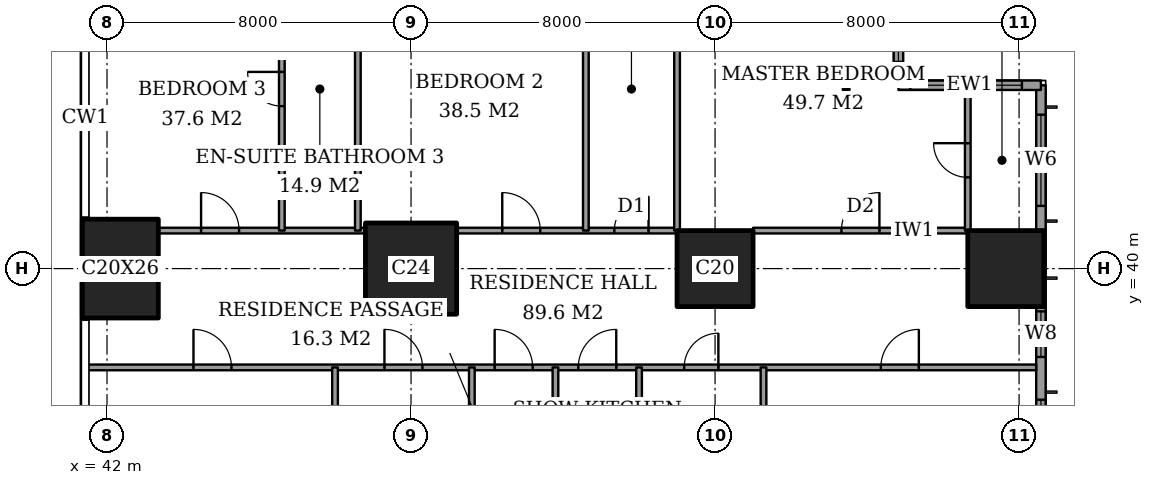
"""IFC4 building model, lengths in metres.
Left out: names, types, materials, properties, quantities, classifications, styles, units other than length and angle.
Written with IfcOpenShell. Run it as: python <this file> out.ifc"""

import sys

from ifc_helpers import new_model, si_unit, direction, frame, frame_2d, origin, origin_2d, place, context, subcontext, project, spatial, rectangle, extrude, element, fill, save


model = new_model("IFC4")
c1 = context("Model", 3, precision=1e-05, world=origin(), true_north=direction((0.0, 1.0)))
c2 = subcontext(c1, "Body", "Model", "MODEL_VIEW")
j1 = project(units=[si_unit("LENGTHUNIT", "METRE"), si_unit("PLANEANGLEUNIT", "RADIAN")], contexts=[c1])
p1 = place(None, origin())
s1 = spatial("IfcSite", under=j1, at=p1, CompositionType="ELEMENT")
p2 = place(p1, origin())
s2 = spatial("IfcBuilding", under=s1, at=p2, CompositionType="ELEMENT")
p3 = place(p2, frame((0.0, 0.0, 44.0)))
s3 = spatial("IfcBuildingStorey", under=s2, at=p3, CompositionType="ELEMENT", Elevation=44.0)
p4 = place(p3, frame((42.35, 40.0, 0.0), z_axis=(0.0, 0.0, 1.0), x_axis=(1.0, 0.0, 0.0)))
e1 = element("IfcColumn", 1, at=p4, inside=s3, PredefinedType="COLUMN", context=c2, shape_type="SweptSolid", body=[
    extrude(rectangle(XDim=2.0, YDim=2.6, at=origin_2d()), origin(), (0.0, 0.0, 1.0), 3.6),
])
p5 = place(p3, frame((50.0, 40.0, 0.0), z_axis=(0.0, 0.0, 1.0), x_axis=(1.0, 0.0, 0.0)))
e2 = element("IfcColumn", 2, at=p5, inside=s3, PredefinedType="COLUMN", context=c2, shape_type="SweptSolid", body=[
    extrude(rectangle(XDim=2.4, YDim=2.4, at=origin_2d()), origin(), (0.0, 0.0, 1.0), 3.6),
])
for number, where, z_axis, x_axis in (
    (3, (58.0, 40.0, 0.0), (0.0, 0.0, 1.0), (1.0, 0.0, 0.0)),
    (4, (65.65, 40.0, 0.0), (0.0, 0.0, 1.0), (1.0, 0.0, 0.0)),
):
    element("IfcColumn", number, at=place(p3, frame(where, z_axis=z_axis, x_axis=x_axis)), inside=s3, PredefinedType="COLUMN", context=c2, shape_type="SweptSolid", body=[
        extrude(rectangle(XDim=2.0, YDim=2.0, at=origin_2d()), origin(), (0.0, 0.0, 1.0), 3.6),
    ])
p6 = place(p3, frame((66.575, 3.175, 0.0), z_axis=(0.0, 0.0, 1.0), x_axis=(0.0, 1.0, 0.0)))
e5 = element("IfcWall", 5, at=p6, inside=s3, PredefinedType="SOLIDWALL", context=c2, shape_type="SweptSolid", body=[
    extrude(rectangle(XDim=41.65, YDim=0.25, at=frame_2d((20.825, 0.0))), origin(), (0.0, 0.0, 1.0), 3.6),
])
p7 = place(p6, frame((0.775, 0.0, 0.6)))
e6 = element("IfcOpeningElement", 6, at=p7, cuts=e5, PredefinedType="OPENING", context=c2, shape_type="SweptSolid", body=[
    extrude(rectangle(XDim=2.4, YDim=2.0, at=frame_2d((1.2, 1.0))), frame((0.0, 0.135, 0.0), z_axis=(0.0, -1.0, 0.0), x_axis=(1.0, 0.0, 0.0)), (0.0, 0.0, 1.0), 0.27),
])
p8 = place(p6, frame((6.1, 0.0, 0.6)))
e7 = element("IfcOpeningElement", 7, at=p8, cuts=e5, PredefinedType="OPENING", context=c2, shape_type="SweptSolid", body=[
    extrude(rectangle(XDim=1.2, YDim=2.0, at=frame_2d((0.6, 1.0))), frame((0.0, 0.135, 0.0), z_axis=(0.0, -1.0, 0.0), x_axis=(1.0, 0.0, 0.0)), (0.0, 0.0, 1.0), 0.27),
])
p9 = place(p6, frame((8.275, 0.0, 0.6)))
e8 = element("IfcOpeningElement", 8, at=p9, cuts=e5, PredefinedType="OPENING", context=c2, shape_type="SweptSolid", body=[
    extrude(rectangle(XDim=2.4, YDim=2.0, at=frame_2d((1.2, 1.0))), frame((0.0, 0.135, 0.0), z_axis=(0.0, -1.0, 0.0), x_axis=(1.0, 0.0, 0.0)), (0.0, 0.0, 1.0), 0.27),
])
p10 = place(p6, frame((15.775, 0.0, 0.6)))
e9 = element("IfcOpeningElement", 9, at=p10, cuts=e5, PredefinedType="OPENING", context=c2, shape_type="SweptSolid", body=[
    extrude(rectangle(XDim=2.4, YDim=2.0, at=frame_2d((1.2, 1.0))), frame((0.0, 0.135, 0.0), z_axis=(0.0, -1.0, 0.0), x_axis=(1.0, 0.0, 0.0)), (0.0, 0.0, 1.0), 0.27),
])
p11 = place(p6, frame((23.475, 0.0, 0.6)))
e10 = element("IfcOpeningElement", 10, at=p11, cuts=e5, PredefinedType="OPENING", context=c2, shape_type="SweptSolid", body=[
    extrude(rectangle(XDim=2.4, YDim=2.0, at=frame_2d((1.2, 1.0))), frame((0.0, 0.135, 0.0), z_axis=(0.0, -1.0, 0.0), x_axis=(1.0, 0.0, 0.0)), (0.0, 0.0, 1.0), 0.27),
])
p12 = place(p6, frame((30.975, 0.0, 0.6)))
e11 = element("IfcOpeningElement", 11, at=p12, cuts=e5, PredefinedType="OPENING", context=c2, shape_type="SweptSolid", body=[
    extrude(rectangle(XDim=2.4, YDim=2.0, at=frame_2d((1.2, 1.0))), frame((0.0, 0.135, 0.0), z_axis=(0.0, -1.0, 0.0), x_axis=(1.0, 0.0, 0.0)), (0.0, 0.0, 1.0), 0.27),
])
p13 = place(p6, frame((34.5, 0.0, 0.6)))
e12 = element("IfcOpeningElement", 12, at=p13, cuts=e5, PredefinedType="OPENING", context=c2, shape_type="SweptSolid", body=[
    extrude(rectangle(XDim=1.2, YDim=2.0, at=frame_2d((0.6, 1.0))), frame((0.0, 0.135, 0.0), z_axis=(0.0, -1.0, 0.0), x_axis=(1.0, 0.0, 0.0)), (0.0, 0.0, 1.0), 0.27),
])
p14 = place(p6, frame((38.475, 0.0, 0.6)))
e13 = element("IfcOpeningElement", 13, at=p14, cuts=e5, PredefinedType="OPENING", context=c2, shape_type="SweptSolid", body=[
    extrude(rectangle(XDim=2.4, YDim=2.0, at=frame_2d((1.2, 1.0))), frame((0.0, 0.135, 0.0), z_axis=(0.0, -1.0, 0.0), x_axis=(1.0, 0.0, 0.0)), (0.0, 0.0, 1.0), 0.27),
])
p15 = place(p3, frame((66.575, 44.825, 0.0), z_axis=(0.0, 0.0, 1.0), x_axis=(-1.0, 0.0, 0.0)))
e14 = element("IfcWall", 14, at=p15, inside=s3, PredefinedType="SOLIDWALL", context=c2, shape_type="SweptSolid", body=[
    extrude(rectangle(XDim=3.75, YDim=0.25, at=frame_2d((1.875, 0.0))), origin(), (0.0, 0.0, 1.0), 3.6),
])
p16 = place(p15, frame((0.5, 0.0, 0.6)))
e15 = element("IfcOpeningElement", 15, at=p16, cuts=e14, PredefinedType="OPENING", context=c2, shape_type="SweptSolid", body=[
    extrude(rectangle(XDim=1.2, YDim=2.0, at=frame_2d((0.6, 1.0))), frame((0.0, 0.135, 0.0), z_axis=(0.0, -1.0, 0.0), x_axis=(1.0, 0.0, 0.0)), (0.0, 0.0, 1.0), 0.27),
])
p17 = place(p15, frame((2.238, 0.0, 0.6)))
e16 = element("IfcOpeningElement", 16, at=p17, cuts=e14, PredefinedType="OPENING", context=c2, shape_type="SweptSolid", body=[
    extrude(rectangle(XDim=1.2, YDim=2.0, at=frame_2d((0.6, 1.0))), frame((0.0, 0.135, 0.0), z_axis=(0.0, -1.0, 0.0), x_axis=(1.0, 0.0, 0.0)), (0.0, 0.0, 1.0), 0.27),
])
p18 = place(p3, frame((62.825, 44.825, 0.0), z_axis=(0.0, 0.0, 1.0), x_axis=(0.0, 1.0, 0.0)))
e17 = element("IfcWall", 17, at=p18, inside=s3, PredefinedType="SOLIDWALL", context=c2, shape_type="SweptSolid", body=[
    extrude(rectangle(XDim=3.75, YDim=0.25, at=frame_2d((1.875, 0.0))), origin(), (0.0, 0.0, 1.0), 3.6),
])
p19 = place(p18, frame((0.613, 0.0, 0.6)))
e18 = element("IfcOpeningElement", 18, at=p19, cuts=e17, PredefinedType="OPENING", context=c2, shape_type="SweptSolid", body=[
    extrude(rectangle(XDim=2.4, YDim=2.0, at=frame_2d((1.2, 1.0))), frame((0.0, 0.135, 0.0), z_axis=(0.0, -1.0, 0.0), x_axis=(1.0, 0.0, 0.0)), (0.0, 0.0, 1.0), 0.27),
])
p20 = place(p3, frame((41.439, 37.4, 0.0), z_axis=(0.0, 0.0, 1.0), x_axis=(1.0, 0.0, 0.0)))
e19 = element("IfcWall", 19, at=p20, inside=s3, PredefinedType="PARTITIONING", context=c2, shape_type="SweptSolid", body=[
    extrude(rectangle(XDim=25.011, YDim=0.15, at=frame_2d((12.505, 0.0))), origin(), (0.0, 0.0, 1.0), 3.35),
])
p21 = place(p20, frame((10.761, 0.0, 0.0)))
e20 = element("IfcOpeningElement", 20, at=p21, cuts=e19, PredefinedType="OPENING", context=c2, shape_type="SweptSolid", body=[
    extrude(rectangle(XDim=1.0, YDim=2.1, at=frame_2d((0.5, 1.05))), frame((0.0, 0.085, 0.0), z_axis=(0.0, -1.0, 0.0), x_axis=(1.0, 0.0, 0.0)), (0.0, 0.0, 1.0), 0.17),
])
p22 = place(p20, frame((20.924, 0.0, 0.0)))
e21 = element("IfcOpeningElement", 21, at=p22, cuts=e19, PredefinedType="OPENING", context=c2, shape_type="SweptSolid", body=[
    extrude(rectangle(XDim=1.0, YDim=2.1, at=frame_2d((0.5, 1.05))), frame((0.0, 0.085, 0.0), z_axis=(0.0, -1.0, 0.0), x_axis=(1.0, 0.0, 0.0)), (0.0, 0.0, 1.0), 0.17),
])
p23 = place(p20, frame((15.749, 0.0, 0.0)))
e22 = element("IfcOpeningElement", 22, at=p23, cuts=e19, PredefinedType="OPENING", context=c2, shape_type="SweptSolid", body=[
    extrude(rectangle(XDim=0.9, YDim=2.1, at=frame_2d((0.45, 1.05))), frame((0.0, 0.085, 0.0), z_axis=(0.0, -1.0, 0.0), x_axis=(1.0, 0.0, 0.0)), (0.0, 0.0, 1.0), 0.17),
])
p24 = place(p20, frame((12.961, 0.0, 0.0)))
e23 = element("IfcOpeningElement", 23, at=p24, cuts=e19, PredefinedType="OPENING", context=c2, shape_type="SweptSolid", body=[
    extrude(rectangle(XDim=1.0, YDim=2.1, at=frame_2d((0.5, 1.05))), frame((0.0, 0.085, 0.0), z_axis=(0.0, -1.0, 0.0), x_axis=(1.0, 0.0, 0.0)), (0.0, 0.0, 1.0), 0.17),
])
p25 = place(p20, frame((7.861, 0.0, 0.0)))
e24 = element("IfcOpeningElement", 24, at=p25, cuts=e19, PredefinedType="OPENING", context=c2, shape_type="SweptSolid", body=[
    extrude(rectangle(XDim=1.0, YDim=2.1, at=frame_2d((0.5, 1.05))), frame((0.0, 0.085, 0.0), z_axis=(0.0, -1.0, 0.0), x_axis=(1.0, 0.0, 0.0)), (0.0, 0.0, 1.0), 0.17),
])
p26 = place(p20, frame((2.836, 0.0, 0.0)))
e25 = element("IfcOpeningElement", 25, at=p26, cuts=e19, PredefinedType="OPENING", context=c2, shape_type="SweptSolid", body=[
    extrude(rectangle(XDim=1.0, YDim=2.1, at=frame_2d((0.5, 1.05))), frame((0.0, 0.085, 0.0), z_axis=(0.0, -1.0, 0.0), x_axis=(1.0, 0.0, 0.0)), (0.0, 0.0, 1.0), 0.17),
])
p27 = place(p3, frame((43.35, 41.0, 0.0), z_axis=(0.0, 0.0, 1.0), x_axis=(1.0, 0.0, 0.0)))
e26 = element("IfcWall", 26, at=p27, inside=s3, PredefinedType="PARTITIONING", context=c2, shape_type="SweptSolid", body=[
    extrude(rectangle(XDim=5.45, YDim=0.15, at=frame_2d((2.725, 0.0))), origin(), (0.0, 0.0, 1.0), 3.35),
])
p28 = place(p27, frame((1.125, 0.0, 0.0)))
e27 = element("IfcOpeningElement", 27, at=p28, cuts=e26, PredefinedType="OPENING", context=c2, shape_type="SweptSolid", body=[
    extrude(rectangle(XDim=1.0, YDim=2.1, at=frame_2d((0.5, 1.05))), frame((0.0, 0.085, 0.0), z_axis=(0.0, -1.0, 0.0), x_axis=(1.0, 0.0, 0.0)), (0.0, 0.0, 1.0), 0.17),
])
p29 = place(p3, frame((51.2, 41.0, 0.0), z_axis=(0.0, 0.0, 1.0), x_axis=(1.0, 0.0, 0.0)))
e28 = element("IfcWall", 28, at=p29, inside=s3, PredefinedType="PARTITIONING", context=c2, shape_type="SweptSolid", body=[
    extrude(rectangle(XDim=5.8, YDim=0.15, at=frame_2d((2.9, 0.0))), origin(), (0.0, 0.0, 1.0), 3.35),
])
p30 = place(p29, frame((4.15, 0.0, 0.0)))
e29 = element("IfcOpeningElement", 29, at=p30, cuts=e28, PredefinedType="OPENING", context=c2, shape_type="SweptSolid", body=[
    extrude(rectangle(XDim=0.9, YDim=2.1, at=frame_2d((0.45, 1.05))), frame((0.0, 0.085, 0.0), z_axis=(0.0, -1.0, 0.0), x_axis=(1.0, 0.0, 0.0)), (0.0, 0.0, 1.0), 0.17),
])
p31 = place(p29, frame((1.2, 0.0, 0.0)))
e30 = element("IfcOpeningElement", 30, at=p31, cuts=e28, PredefinedType="OPENING", context=c2, shape_type="SweptSolid", body=[
    extrude(rectangle(XDim=1.0, YDim=2.1, at=frame_2d((0.5, 1.05))), frame((0.0, 0.085, 0.0), z_axis=(0.0, -1.0, 0.0), x_axis=(1.0, 0.0, 0.0)), (0.0, 0.0, 1.0), 0.17),
])
p32 = place(p3, frame((59.0, 41.0, 0.0), z_axis=(0.0, 0.0, 1.0), x_axis=(1.0, 0.0, 0.0)))
e31 = element("IfcWall", 31, at=p32, inside=s3, PredefinedType="PARTITIONING", context=c2, shape_type="SweptSolid", body=[
    extrude(rectangle(XDim=5.65, YDim=0.15, at=frame_2d((2.825, 0.0))), origin(), (0.0, 0.0, 1.0), 3.35),
])
p33 = place(p32, frame((2.325, 0.0, 0.0)))
e32 = element("IfcOpeningElement", 32, at=p33, cuts=e31, PredefinedType="OPENING", context=c2, shape_type="SweptSolid", body=[
    extrude(rectangle(XDim=1.0, YDim=2.1, at=frame_2d((0.5, 1.05))), frame((0.0, 0.085, 0.0), z_axis=(0.0, -1.0, 0.0), x_axis=(1.0, 0.0, 0.0)), (0.0, 0.0, 1.0), 0.17),
])
p34 = place(p3, frame((46.6, 41.0, 0.0), z_axis=(0.0, 0.0, 1.0), x_axis=(0.0, 1.0, 0.0)))
e33 = element("IfcWall", 33, at=p34, inside=s3, PredefinedType="PARTITIONING", context=c2, shape_type="SweptSolid", body=[
    extrude(rectangle(XDim=7.45, YDim=0.15, at=frame_2d((3.725, 0.0))), origin(), (0.0, 0.0, 1.0), 3.35),
])
p35 = place(p34, frame((3.275, 0.0, 0.0)))
e34 = element("IfcOpeningElement", 34, at=p35, cuts=e33, PredefinedType="OPENING", context=c2, shape_type="SweptSolid", body=[
    extrude(rectangle(XDim=0.9, YDim=2.1, at=frame_2d((0.45, 1.05))), frame((0.0, 0.085, 0.0), z_axis=(0.0, -1.0, 0.0), x_axis=(1.0, 0.0, 0.0)), (0.0, 0.0, 1.0), 0.17),
])
p36 = place(p3, frame((48.0, 28.0, 0.0), z_axis=(0.0, 0.0, 1.0), x_axis=(0.0, 1.0, 0.0)))
e35 = element("IfcWall", 35, at=p36, inside=s3, PredefinedType="PARTITIONING", context=c2, shape_type="SweptSolid", body=[
    extrude(rectangle(XDim=9.4, YDim=0.15, at=frame_2d((4.7, 0.0))), origin(), (0.0, 0.0, 1.0), 3.35),
])
p37 = place(p36, frame((0.55, 0.0, 0.0)))
e36 = element("IfcOpeningElement", 36, at=p37, cuts=e35, PredefinedType="OPENING", context=c2, shape_type="SweptSolid", body=[
    extrude(rectangle(XDim=0.9, YDim=2.1, at=frame_2d((0.45, 1.05))), frame((0.0, 0.085, 0.0), z_axis=(0.0, -1.0, 0.0), x_axis=(1.0, 0.0, 0.0)), (0.0, 0.0, 1.0), 0.17),
])
p38 = place(p3, frame((48.6, 41.0, 0.0), z_axis=(0.0, 0.0, 1.0), x_axis=(0.0, 1.0, 0.0)))
e37 = element("IfcWall", 37, at=p38, inside=s3, PredefinedType="PARTITIONING", context=c2, shape_type="SweptSolid", body=[
    extrude(rectangle(XDim=7.45, YDim=0.15, at=frame_2d((3.725, 0.0))), origin(), (0.0, 0.0, 1.0), 3.35),
])
for number, where, z_axis, x_axis in (
    (38, (51.6, 30.0, 0.0), (0.0, 0.0, 1.0), (0.0, 1.0, 0.0)),
    (39, (53.8, 30.0, 0.0), (0.0, 0.0, 1.0), (0.0, 1.0, 0.0)),
):
    element("IfcWall", number, at=place(p3, frame(where, z_axis=z_axis, x_axis=x_axis)), inside=s3, PredefinedType="PARTITIONING", context=c2, shape_type="SweptSolid", body=[
        extrude(rectangle(XDim=7.4, YDim=0.15, at=frame_2d((3.7, 0.0))), origin(), (0.0, 0.0, 1.0), 3.35),
    ])
p39 = place(p3, frame((54.6, 41.0, 0.0), z_axis=(0.0, 0.0, 1.0), x_axis=(0.0, 1.0, 0.0)))
e40 = element("IfcWall", 40, at=p39, inside=s3, PredefinedType="PARTITIONING", context=c2, shape_type="SweptSolid", body=[
    extrude(rectangle(XDim=7.45, YDim=0.15, at=frame_2d((3.725, 0.0))), origin(), (0.0, 0.0, 1.0), 3.35),
])
p40 = place(p3, frame((56.0, 28.0, 0.0), z_axis=(0.0, 0.0, 1.0), x_axis=(0.0, 1.0, 0.0)))
e41 = element("IfcWall", 41, at=p40, inside=s3, PredefinedType="PARTITIONING", context=c2, shape_type="SweptSolid", body=[
    extrude(rectangle(XDim=9.4, YDim=0.15, at=frame_2d((4.7, 0.0))), origin(), (0.0, 0.0, 1.0), 3.35),
])
p41 = place(p40, frame((0.5, 0.0, 0.0)))
e42 = element("IfcOpeningElement", 42, at=p41, cuts=e41, PredefinedType="OPENING", context=c2, shape_type="SweptSolid", body=[
    extrude(rectangle(XDim=1.0, YDim=2.1, at=frame_2d((0.5, 1.05))), frame((0.0, 0.085, 0.0), z_axis=(0.0, -1.0, 0.0), x_axis=(1.0, 0.0, 0.0)), (0.0, 0.0, 1.0), 0.17),
])
p42 = place(p3, frame((57.0, 41.0, 0.0), z_axis=(0.0, 0.0, 1.0), x_axis=(0.0, 1.0, 0.0)))
e43 = element("IfcWall", 43, at=p42, inside=s3, PredefinedType="PARTITIONING", context=c2, shape_type="SweptSolid", body=[
    extrude(rectangle(XDim=5.65, YDim=0.15, at=frame_2d((2.825, 0.0))), origin(), (0.0, 0.0, 1.0), 3.35),
])
p43 = place(p3, frame((59.275, 33.2, 0.0), z_axis=(0.0, 0.0, 1.0), x_axis=(0.0, 1.0, 0.0)))
e44 = element("IfcWall", 44, at=p43, inside=s3, PredefinedType="PARTITIONING", context=c2, shape_type="SweptSolid", body=[
    extrude(rectangle(XDim=4.2, YDim=0.15, at=frame_2d((2.1, 0.0))), origin(), (0.0, 0.0, 1.0), 3.35),
])
p44 = place(p3, frame((64.65, 41.0, 0.0), z_axis=(0.0, 0.0, 1.0), x_axis=(0.0, 1.0, 0.0)))
e45 = element("IfcWall", 45, at=p44, inside=s3, PredefinedType="PARTITIONING", context=c2, shape_type="SweptSolid", body=[
    extrude(rectangle(XDim=3.7, YDim=0.15, at=frame_2d((1.85, 0.0))), origin(), (0.0, 0.0, 1.0), 3.35),
])
p45 = place(p44, frame((1.4, 0.0, 0.0)))
e46 = element("IfcOpeningElement", 46, at=p45, cuts=e45, PredefinedType="OPENING", context=c2, shape_type="SweptSolid", body=[
    extrude(rectangle(XDim=0.9, YDim=2.1, at=frame_2d((0.45, 1.05))), frame((0.0, 0.085, 0.0), z_axis=(0.0, -1.0, 0.0), x_axis=(1.0, 0.0, 0.0)), (0.0, 0.0, 1.0), 0.17),
])
p46 = place(p12, origin())
e47 = element("IfcWindow", 47, at=p46, inside=s3, PartitioningType="SINGLE_PANEL", PredefinedType="WINDOW", context=c2, shape_type="SweptSolid", body=[
    extrude(rectangle(XDim=2.4, YDim=2.0, at=frame_2d((1.2, 1.0))), frame((0.0, 0.03, 0.0), z_axis=(0.0, -1.0, 0.0), x_axis=(1.0, 0.0, 0.0)), (0.0, 0.0, 1.0), 0.06),
])
fill(e11, e47)
p47 = place(p13, origin())
e48 = element("IfcWindow", 48, at=p47, inside=s3, PartitioningType="SINGLE_PANEL", PredefinedType="WINDOW", context=c2, shape_type="SweptSolid", body=[
    extrude(rectangle(XDim=1.2, YDim=2.0, at=frame_2d((0.6, 1.0))), frame((0.0, 0.03, 0.0), z_axis=(0.0, -1.0, 0.0), x_axis=(1.0, 0.0, 0.0)), (0.0, 0.0, 1.0), 0.06),
])
fill(e12, e48)
p48 = place(p14, origin())
e49 = element("IfcWindow", 49, at=p48, inside=s3, PartitioningType="SINGLE_PANEL", PredefinedType="WINDOW", context=c2, shape_type="SweptSolid", body=[
    extrude(rectangle(XDim=2.4, YDim=2.0, at=frame_2d((1.2, 1.0))), frame((0.0, 0.03, 0.0), z_axis=(0.0, -1.0, 0.0), x_axis=(1.0, 0.0, 0.0)), (0.0, 0.0, 1.0), 0.06),
])
fill(e13, e49)
p49 = place(p16, origin())
e50 = element("IfcWindow", 50, at=p49, inside=s3, PartitioningType="SINGLE_PANEL", PredefinedType="WINDOW", context=c2, shape_type="SweptSolid", body=[
    extrude(rectangle(XDim=1.2, YDim=2.0, at=frame_2d((0.6, 1.0))), frame((0.0, 0.03, 0.0), z_axis=(0.0, -1.0, 0.0), x_axis=(1.0, 0.0, 0.0)), (0.0, 0.0, 1.0), 0.06),
])
fill(e15, e50)
p50 = place(p17, origin())
e51 = element("IfcWindow", 51, at=p50, inside=s3, PartitioningType="SINGLE_PANEL", PredefinedType="WINDOW", context=c2, shape_type="SweptSolid", body=[
    extrude(rectangle(XDim=1.2, YDim=2.0, at=frame_2d((0.6, 1.0))), frame((0.0, 0.03, 0.0), z_axis=(0.0, -1.0, 0.0), x_axis=(1.0, 0.0, 0.0)), (0.0, 0.0, 1.0), 0.06),
])
fill(e16, e51)
p51 = place(p19, origin())
e52 = element("IfcWindow", 52, at=p51, inside=s3, PartitioningType="SINGLE_PANEL", PredefinedType="WINDOW", context=c2, shape_type="SweptSolid", body=[
    extrude(rectangle(XDim=2.4, YDim=2.0, at=frame_2d((1.2, 1.0))), frame((0.0, 0.03, 0.0), z_axis=(0.0, -1.0, 0.0), x_axis=(1.0, 0.0, 0.0)), (0.0, 0.0, 1.0), 0.06),
])
fill(e18, e52)
p52 = place(p45, origin())
e53 = element("IfcDoor", 53, at=p52, inside=s3, OperationType="SINGLE_SWING_LEFT", PredefinedType="DOOR", context=c2, shape_type="SweptSolid", body=[
    extrude(rectangle(XDim=0.9, YDim=2.1, at=frame_2d((0.45, 1.05))), frame((0.0, 0.025, 0.0), z_axis=(0.0, -1.0, 0.0), x_axis=(1.0, 0.0, 0.0)), (0.0, 0.0, 1.0), 0.05),
])
fill(e46, e53)
p53 = place(p33, origin())
e54 = element("IfcDoor", 54, at=p53, inside=s3, OperationType="SINGLE_SWING_LEFT", PredefinedType="DOOR", context=c2, shape_type="SweptSolid", body=[
    extrude(rectangle(XDim=1.0, YDim=2.1, at=frame_2d((0.5, 1.05))), frame((0.0, 0.025, 0.0), z_axis=(0.0, -1.0, 0.0), x_axis=(1.0, 0.0, 0.0)), (0.0, 0.0, 1.0), 0.05),
])
fill(e32, e54)
p54 = place(p30, origin())
e55 = element("IfcDoor", 55, at=p54, inside=s3, OperationType="SINGLE_SWING_LEFT", PredefinedType="DOOR", context=c2, shape_type="SweptSolid", body=[
    extrude(rectangle(XDim=0.9, YDim=2.1, at=frame_2d((0.45, 1.05))), frame((0.0, 0.025, 0.0), z_axis=(0.0, -1.0, 0.0), x_axis=(1.0, 0.0, 0.0)), (0.0, 0.0, 1.0), 0.05),
])
fill(e29, e55)
p55 = place(p31, origin())
e56 = element("IfcDoor", 56, at=p55, inside=s3, OperationType="SINGLE_SWING_RIGHT", PredefinedType="DOOR", context=c2, shape_type="SweptSolid", body=[
    extrude(rectangle(XDim=1.0, YDim=2.1, at=frame_2d((0.5, 1.05))), frame((0.0, 0.025, 0.0), z_axis=(0.0, -1.0, 0.0), x_axis=(1.0, 0.0, 0.0)), (0.0, 0.0, 1.0), 0.05),
])
fill(e30, e56)
p56 = place(p35, origin())
e57 = element("IfcDoor", 57, at=p56, inside=s3, OperationType="SINGLE_SWING_LEFT", PredefinedType="DOOR", context=c2, shape_type="SweptSolid", body=[
    extrude(rectangle(XDim=0.9, YDim=2.1, at=frame_2d((0.45, 1.05))), frame((0.0, 0.025, 0.0), z_axis=(0.0, -1.0, 0.0), x_axis=(1.0, 0.0, 0.0)), (0.0, 0.0, 1.0), 0.05),
])
fill(e34, e57)
p57 = place(p28, origin())
e58 = element("IfcDoor", 58, at=p57, inside=s3, OperationType="SINGLE_SWING_RIGHT", PredefinedType="DOOR", context=c2, shape_type="SweptSolid", body=[
    extrude(rectangle(XDim=1.0, YDim=2.1, at=frame_2d((0.5, 1.05))), frame((0.0, 0.025, 0.0), z_axis=(0.0, -1.0, 0.0), x_axis=(1.0, 0.0, 0.0)), (0.0, 0.0, 1.0), 0.05),
])
fill(e27, e58)
p58 = place(p21, origin())
e59 = element("IfcDoor", 59, at=p58, inside=s3, OperationType="SINGLE_SWING_RIGHT", PredefinedType="DOOR", context=c2, shape_type="SweptSolid", body=[
    extrude(rectangle(XDim=1.0, YDim=2.1, at=frame_2d((0.5, 1.05))), frame((0.0, 0.025, 0.0), z_axis=(0.0, -1.0, 0.0), x_axis=(1.0, 0.0, 0.0)), (0.0, 0.0, 1.0), 0.05),
])
fill(e20, e59)
p59 = place(p22, origin())
e60 = element("IfcDoor", 60, at=p59, inside=s3, OperationType="SINGLE_SWING_LEFT", PredefinedType="DOOR", context=c2, shape_type="SweptSolid", body=[
    extrude(rectangle(XDim=1.0, YDim=2.1, at=frame_2d((0.5, 1.05))), frame((0.0, 0.025, 0.0), z_axis=(0.0, -1.0, 0.0), x_axis=(1.0, 0.0, 0.0)), (0.0, 0.0, 1.0), 0.05),
])
fill(e21, e60)
p60 = place(p23, origin())
e61 = element("IfcDoor", 61, at=p60, inside=s3, OperationType="SINGLE_SWING_LEFT", PredefinedType="DOOR", context=c2, shape_type="SweptSolid", body=[
    extrude(rectangle(XDim=0.9, YDim=2.1, at=frame_2d((0.45, 1.05))), frame((0.0, 0.025, 0.0), z_axis=(0.0, -1.0, 0.0), x_axis=(1.0, 0.0, 0.0)), (0.0, 0.0, 1.0), 0.05),
])
fill(e22, e61)
p61 = place(p24, origin())
e62 = element("IfcDoor", 62, at=p61, inside=s3, OperationType="SINGLE_SWING_LEFT", PredefinedType="DOOR", context=c2, shape_type="SweptSolid", body=[
    extrude(rectangle(XDim=1.0, YDim=2.1, at=frame_2d((0.5, 1.05))), frame((0.0, 0.025, 0.0), z_axis=(0.0, -1.0, 0.0), x_axis=(1.0, 0.0, 0.0)), (0.0, 0.0, 1.0), 0.05),
])
fill(e23, e62)
p62 = place(p25, origin())
e63 = element("IfcDoor", 63, at=p62, inside=s3, OperationType="SINGLE_SWING_RIGHT", PredefinedType="DOOR", context=c2, shape_type="SweptSolid", body=[
    extrude(rectangle(XDim=1.0, YDim=2.1, at=frame_2d((0.5, 1.05))), frame((0.0, 0.025, 0.0), z_axis=(0.0, -1.0, 0.0), x_axis=(1.0, 0.0, 0.0)), (0.0, 0.0, 1.0), 0.05),
])
fill(e24, e63)
p63 = place(p26, origin())
e64 = element("IfcDoor", 64, at=p63, inside=s3, OperationType="SINGLE_SWING_RIGHT", PredefinedType="DOOR", context=c2, shape_type="SweptSolid", body=[
    extrude(rectangle(XDim=1.0, YDim=2.1, at=frame_2d((0.5, 1.05))), frame((0.0, 0.025, 0.0), z_axis=(0.0, -1.0, 0.0), x_axis=(1.0, 0.0, 0.0)), (0.0, 0.0, 1.0), 0.05),
])
fill(e25, e64)
save(model, sys.argv[1])
